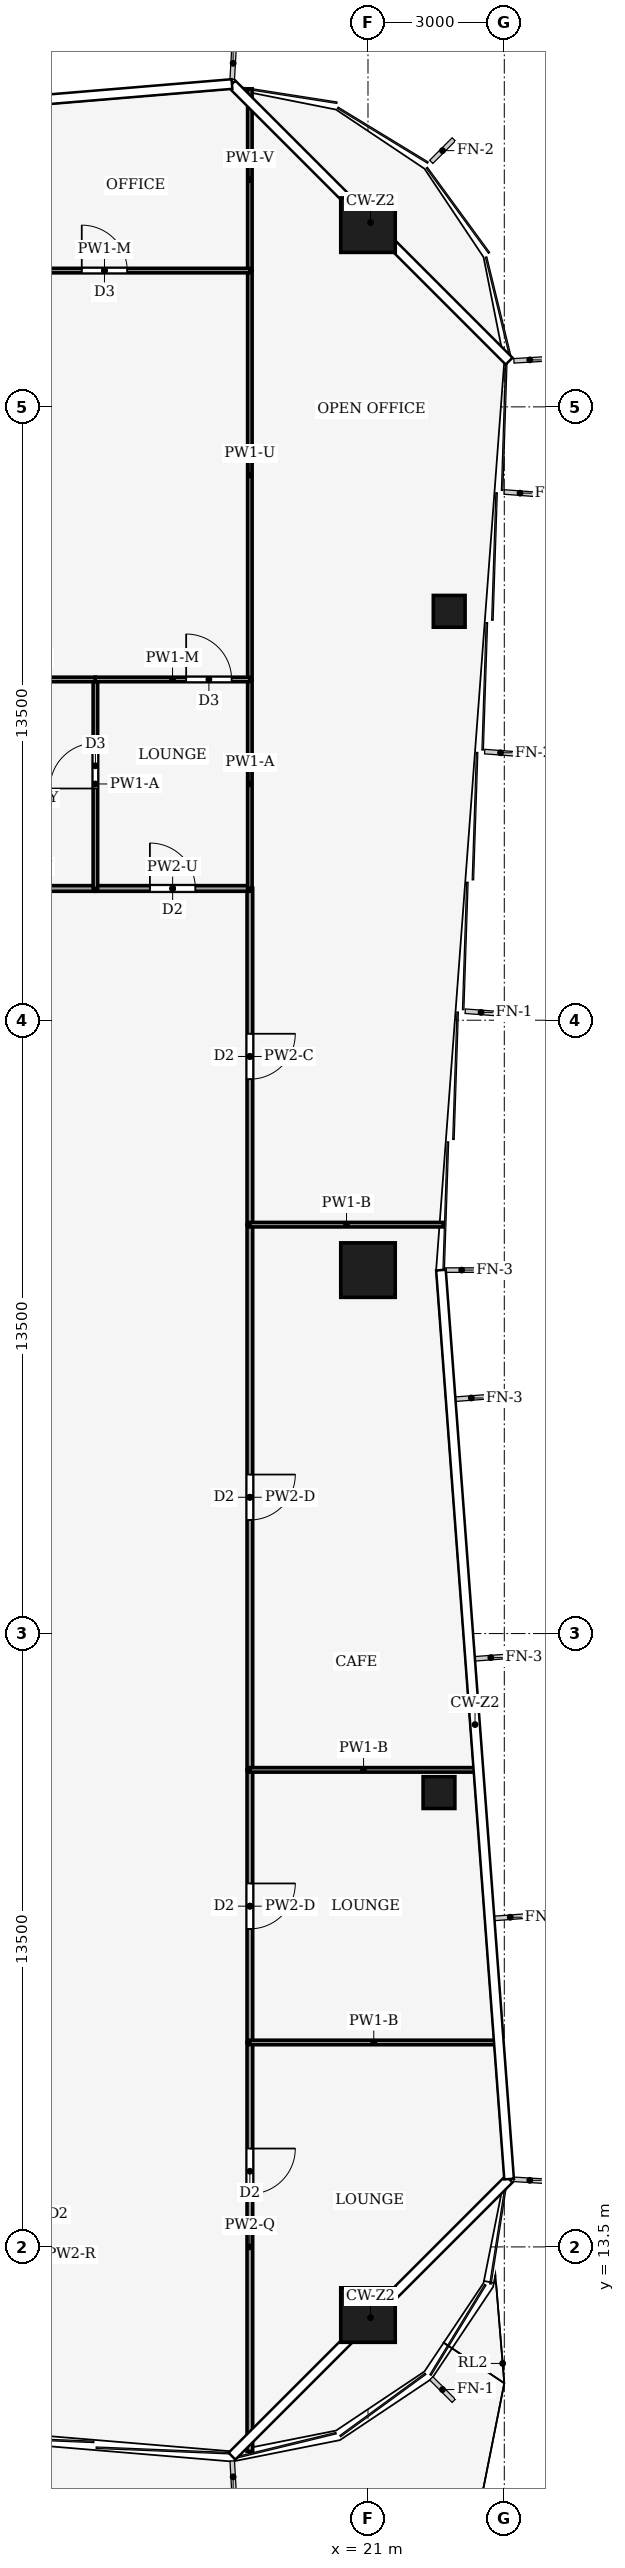
"""IFC4 building model, lengths in metres.
Left out: names, types, materials, properties, quantities, classifications, styles, units other than length and angle.
Written with IfcOpenShell. Run it as: python <this file> out.ifc"""

import sys

from ifc_helpers import new_model, si_unit, direction, frame, frame_2d, origin, origin_2d, place, context, subcontext, project, spatial, rectangle, hollow_rectangle, extrude, element, fill, save


model = new_model("IFC4")
c1 = context("Model", 3, precision=1e-05, world=origin(), true_north=direction((0.0, 1.0)))
c2 = subcontext(c1, "Body", "Model", "MODEL_VIEW")
j1 = project(units=[si_unit("LENGTHUNIT", "METRE"), si_unit("PLANEANGLEUNIT", "RADIAN")], contexts=[c1])
p1 = place(None, origin())
s1 = spatial("IfcSite", under=j1, at=p1, CompositionType="ELEMENT")
p2 = place(p1, origin())
s2 = spatial("IfcBuilding", under=s1, at=p2, CompositionType="ELEMENT")
p3 = place(p2, frame((0.0, 0.0, 121.0)))
s3 = spatial("IfcBuildingStorey", under=s2, at=p3, CompositionType="ELEMENT", Elevation=121.0)
for number, where, z_axis, x_axis in (
    (1, (21.0, 58.0, 0.0), (0.0, 0.0, 1.0), (1.0, 0.0, 0.0)),
    (2, (21.0, 35.0, 0.0), (0.0, 0.0, 1.0), (1.0, 0.0, 0.0)),
    (3, (21.0, 12.0, 0.0), (0.0, 0.0, 1.0), (1.0, 0.0, 0.0)),
):
    element("IfcColumn", number, at=place(p3, frame(where, z_axis=z_axis, x_axis=x_axis)), inside=s3, PredefinedType="COLUMN", context=c2, shape_type="SweptSolid", body=[
        extrude(hollow_rectangle(XDim=1.2, YDim=1.2, WallThickness=0.07, at=origin_2d()), origin(), (0.0, 0.0, 1.0), 5.0),
    ])
for number, where, z_axis, x_axis in (
    (4, (22.562, 23.5, 0.0), (0.0, 0.0, 1.0), (1.0, 0.0, 0.0)),
    (5, (22.788, 49.5, 0.0), (0.0, 0.0, 1.0), (1.0, 0.0, 0.0)),
):
    element("IfcColumn", number, at=place(p3, frame(where, z_axis=z_axis, x_axis=x_axis)), inside=s3, PredefinedType="COLUMN", context=c2, shape_type="SweptSolid", body=[
        extrude(hollow_rectangle(XDim=0.7, YDim=0.7, WallThickness=0.03, at=origin_2d()), origin(), (0.0, 0.0, 1.0), 5.0),
    ])
p4 = place(p3, frame((18.4, 18.0, 0.0), z_axis=(0.0, 0.0, 1.0), x_axis=(0.0, -1.0, 0.0)))
e6 = element("IfcWall", 6, at=p4, inside=s3, PredefinedType="PARTITIONING", context=c2, shape_type="SweptSolid", body=[
    extrude(rectangle(XDim=9.0, YDim=0.125, at=frame_2d((4.5, 0.0))), origin(), (0.0, 0.0, 1.0), 3.93),
])
p5 = place(p4, frame((2.335, 0.0, 0.0)))
e7 = element("IfcOpeningElement", 7, at=p5, cuts=e6, PredefinedType="OPENING", context=c2, shape_type="SweptSolid", body=[
    extrude(rectangle(XDim=1.0, YDim=2.1, at=frame_2d((0.5, 1.05))), frame((0.0, 0.073, 0.0), z_axis=(0.0, -1.0, 0.0), x_axis=(1.0, 0.0, 0.0)), (0.0, 0.0, 1.0), 0.145),
])
p6 = place(p3, frame((18.4, 24.0, 0.0), z_axis=(0.0, 0.0, 1.0), x_axis=(0.0, -1.0, 0.0)))
e8 = element("IfcWall", 8, at=p6, inside=s3, PredefinedType="PARTITIONING", context=c2, shape_type="SweptSolid", body=[
    extrude(rectangle(XDim=6.0, YDim=0.125, at=frame_2d((3.0, 0.0))), origin(), (0.0, 0.0, 1.0), 4.48),
])
p7 = place(p6, frame((2.5, 0.0, 0.0)))
e9 = element("IfcOpeningElement", 9, at=p7, cuts=e8, PredefinedType="OPENING", context=c2, shape_type="SweptSolid", body=[
    extrude(rectangle(XDim=1.0, YDim=2.1, at=frame_2d((0.5, 1.05))), frame((0.0, 0.073, 0.0), z_axis=(0.0, -1.0, 0.0), x_axis=(1.0, 0.0, 0.0)), (0.0, 0.0, 1.0), 0.145),
])
p8 = place(p3, frame((18.4, 36.0, 0.0), z_axis=(0.0, 0.0, 1.0), x_axis=(0.0, -1.0, 0.0)))
e10 = element("IfcWall", 10, at=p8, inside=s3, PredefinedType="PARTITIONING", context=c2, shape_type="SweptSolid", body=[
    extrude(rectangle(XDim=12.0, YDim=0.125, at=frame_2d((6.0, 0.0))), origin(), (0.0, 0.0, 1.0), 4.48),
])
p9 = place(p8, frame((5.5, 0.0, 0.0)))
e11 = element("IfcOpeningElement", 11, at=p9, cuts=e10, PredefinedType="OPENING", context=c2, shape_type="SweptSolid", body=[
    extrude(rectangle(XDim=1.0, YDim=2.1, at=frame_2d((0.5, 1.05))), frame((0.0, 0.073, 0.0), z_axis=(0.0, -1.0, 0.0), x_axis=(1.0, 0.0, 0.0)), (0.0, 0.0, 1.0), 0.145),
])
p10 = place(p3, frame((18.4, 43.404, 0.0), z_axis=(0.0, 0.0, 1.0), x_axis=(0.0, -1.0, 0.0)))
e12 = element("IfcWall", 12, at=p10, inside=s3, PredefinedType="PARTITIONING", context=c2, shape_type="SweptSolid", body=[
    extrude(rectangle(XDim=7.404, YDim=0.125, at=frame_2d((3.702, 0.0))), origin(), (0.0, 0.0, 1.0), 4.14),
])
p11 = place(p10, frame((3.202, 0.0, 0.0)))
e13 = element("IfcOpeningElement", 13, at=p11, cuts=e12, PredefinedType="OPENING", context=c2, shape_type="SweptSolid", body=[
    extrude(rectangle(XDim=1.0, YDim=2.1, at=frame_2d((0.5, 1.05))), frame((0.0, 0.073, 0.0), z_axis=(0.0, -1.0, 0.0), x_axis=(1.0, 0.0, 0.0)), (0.0, 0.0, 1.0), 0.145),
])
p12 = place(p3, frame((15.0, 43.4, 0.0), z_axis=(0.0, 0.0, 1.0), x_axis=(-1.0, 0.0, 0.0)))
e14 = element("IfcWall", 14, at=p12, inside=s3, PredefinedType="PARTITIONING", context=c2, shape_type="SweptSolid", body=[
    extrude(rectangle(XDim=3.0, YDim=0.125, at=frame_2d((1.5, 0.0))), origin(), (0.0, 0.0, 1.0), 4.44),
])
p13 = place(p3, frame((15.0, 43.4, 0.0), z_axis=(0.0, 0.0, 1.0), x_axis=(1.0, 0.0, 0.0)))
e15 = element("IfcWall", 15, at=p13, inside=s3, PredefinedType="PARTITIONING", context=c2, shape_type="SweptSolid", body=[
    extrude(rectangle(XDim=3.4, YDim=0.125, at=frame_2d((1.7, 0.0))), origin(), (0.0, 0.0, 1.0), 4.44),
])
p14 = place(p13, frame((1.2, 0.0, 0.0)))
e16 = element("IfcOpeningElement", 16, at=p14, cuts=e15, PredefinedType="OPENING", context=c2, shape_type="SweptSolid", body=[
    extrude(rectangle(XDim=1.0, YDim=2.1, at=frame_2d((0.5, 1.05))), frame((0.0, 0.073, 0.0), z_axis=(0.0, -1.0, 0.0), x_axis=(1.0, 0.0, 0.0)), (0.0, 0.0, 1.0), 0.145),
])
p15 = place(p3, frame((23.855, 18.0, 0.0), z_axis=(0.0, 0.0, 1.0), x_axis=(-1.0, 0.0, 0.0)))
e17 = element("IfcWall", 17, at=p15, inside=s3, PredefinedType="PARTITIONING", context=c2, shape_type="SweptSolid", body=[
    extrude(rectangle(XDim=5.455, YDim=0.1, at=frame_2d((2.728, 0.0))), origin(), (0.0, 0.0, 1.0), 4.04),
])
p16 = place(p3, frame((23.405, 24.0, 0.0), z_axis=(0.0, 0.0, 1.0), x_axis=(-1.0, 0.0, 0.0)))
e18 = element("IfcWall", 18, at=p16, inside=s3, PredefinedType="PARTITIONING", context=c2, shape_type="SweptSolid", body=[
    extrude(rectangle(XDim=5.005, YDim=0.1, at=frame_2d((2.502, 0.0))), origin(), (0.0, 0.0, 1.0), 4.04),
])
p17 = place(p3, frame((22.655, 36.0, 0.0), z_axis=(0.0, 0.0, 1.0), x_axis=(-1.0, 0.0, 0.0)))
e19 = element("IfcWall", 19, at=p17, inside=s3, PredefinedType="PARTITIONING", context=c2, shape_type="SweptSolid", body=[
    extrude(rectangle(XDim=4.255, YDim=0.1, at=frame_2d((2.127, 0.0))), origin(), (0.0, 0.0, 1.0), 4.04),
])
p18 = place(p3, frame((18.4, 48.0, 0.0), z_axis=(0.0, 0.0, 1.0), x_axis=(0.0, -1.0, 0.0)))
e20 = element("IfcWall", 20, at=p18, inside=s3, PredefinedType="PARTITIONING", context=c2, shape_type="SweptSolid", body=[
    extrude(rectangle(XDim=4.6, YDim=0.1, at=frame_2d((2.3, 0.0))), origin(), (0.0, 0.0, 1.0), 4.87),
])
p19 = place(p3, frame((18.4, 57.0, 0.0), z_axis=(0.0, 0.0, 1.0), x_axis=(0.0, -1.0, 0.0)))
e21 = element("IfcWall", 21, at=p19, inside=s3, PredefinedType="PARTITIONING", context=c2, shape_type="SweptSolid", body=[
    extrude(rectangle(XDim=9.0, YDim=0.1, at=frame_2d((4.5, 0.0))), origin(), (0.0, 0.0, 1.0), 4.24),
])
p20 = place(p3, frame((18.4, 61.0, 0.0), z_axis=(0.0, 0.0, 1.0), x_axis=(0.0, -1.0, 0.0)))
e22 = element("IfcWall", 22, at=p20, inside=s3, PredefinedType="PARTITIONING", context=c2, shape_type="SweptSolid", body=[
    extrude(rectangle(XDim=4.0, YDim=0.1, at=frame_2d((2.0, 0.0))), origin(), (0.0, 0.0, 1.0), 3.93),
])
p21 = place(p3, frame((15.0, 43.4, 0.0), z_axis=(0.0, 0.0, 1.0), x_axis=(0.0, 1.0, 0.0)))
e23 = element("IfcWall", 23, at=p21, inside=s3, PredefinedType="PARTITIONING", context=c2, shape_type="SweptSolid", body=[
    extrude(rectangle(XDim=4.6, YDim=0.1, at=frame_2d((2.3, 0.0))), origin(), (0.0, 0.0, 1.0), 4.87),
])
p22 = place(p21, frame((2.2, 0.0, 0.0)))
e24 = element("IfcOpeningElement", 24, at=p22, cuts=e23, PredefinedType="OPENING", context=c2, shape_type="SweptSolid", body=[
    extrude(rectangle(XDim=1.0, YDim=2.1, at=frame_2d((0.5, 1.05))), frame((0.0, 0.06, 0.0), z_axis=(0.0, -1.0, 0.0), x_axis=(1.0, 0.0, 0.0)), (0.0, 0.0, 1.0), 0.12),
])
p23 = place(p3, frame((15.004, 48.0, 0.0), z_axis=(0.0, 0.0, 1.0), x_axis=(-1.0, 0.0, 0.0)))
e25 = element("IfcWall", 25, at=p23, inside=s3, PredefinedType="PARTITIONING", context=c2, shape_type="SweptSolid", body=[
    extrude(rectangle(XDim=3.008, YDim=0.1, at=frame_2d((1.504, 0.0))), origin(), (0.0, 0.0, 1.0), 4.87),
])
p24 = place(p3, frame((14.996, 48.0, 0.0), z_axis=(0.0, 0.0, 1.0), x_axis=(1.0, 0.0, 0.0)))
e26 = element("IfcWall", 26, at=p24, inside=s3, PredefinedType="PARTITIONING", context=c2, shape_type="SweptSolid", body=[
    extrude(rectangle(XDim=3.404, YDim=0.1, at=frame_2d((1.702, 0.0))), origin(), (0.0, 0.0, 1.0), 4.44),
])
p25 = place(p24, frame((2.002, 0.0, 0.0)))
e27 = element("IfcOpeningElement", 27, at=p25, cuts=e26, PredefinedType="OPENING", context=c2, shape_type="SweptSolid", body=[
    extrude(rectangle(XDim=1.0, YDim=2.1, at=frame_2d((0.5, 1.05))), frame((0.0, 0.06, 0.0), z_axis=(0.0, -1.0, 0.0), x_axis=(1.0, 0.0, 0.0)), (0.0, 0.0, 1.0), 0.12),
])
p26 = place(p3, frame((12.0, 57.0, 0.0), z_axis=(0.0, 0.0, 1.0), x_axis=(1.0, 0.0, 0.0)))
e28 = element("IfcWall", 28, at=p26, inside=s3, PredefinedType="PARTITIONING", context=c2, shape_type="SweptSolid", body=[
    extrude(rectangle(XDim=6.4, YDim=0.1, at=frame_2d((3.2, 0.0))), origin(), (0.0, 0.0, 1.0), 4.44),
])
p27 = place(p26, frame((2.7, 0.0, 0.0)))
e29 = element("IfcOpeningElement", 29, at=p27, cuts=e28, PredefinedType="OPENING", context=c2, shape_type="SweptSolid", body=[
    extrude(rectangle(XDim=1.0, YDim=2.1, at=frame_2d((0.5, 1.05))), frame((0.0, 0.06, 0.0), z_axis=(0.0, -1.0, 0.0), x_axis=(1.0, 0.0, 0.0)), (0.0, 0.0, 1.0), 0.12),
])
p28 = place(p5, origin())
e30 = element("IfcDoor", 30, at=p28, inside=s3, OperationType="SINGLE_SWING_LEFT", PredefinedType="DOOR", context=c2, shape_type="SweptSolid", body=[
    extrude(rectangle(XDim=1.0, YDim=2.1, at=frame_2d((0.5, 1.05))), frame((0.0, 0.025, 0.0), z_axis=(0.0, -1.0, 0.0), x_axis=(1.0, 0.0, 0.0)), (0.0, 0.0, 1.0), 0.05),
])
fill(e7, e30)
p29 = place(p7, origin())
e31 = element("IfcDoor", 31, at=p29, inside=s3, OperationType="SINGLE_SWING_RIGHT", PredefinedType="DOOR", context=c2, shape_type="SweptSolid", body=[
    extrude(rectangle(XDim=1.0, YDim=2.1, at=frame_2d((0.5, 1.05))), frame((0.0, 0.025, 0.0), z_axis=(0.0, -1.0, 0.0), x_axis=(1.0, 0.0, 0.0)), (0.0, 0.0, 1.0), 0.05),
])
fill(e9, e31)
p30 = place(p9, origin())
e32 = element("IfcDoor", 32, at=p30, inside=s3, OperationType="SINGLE_SWING_LEFT", PredefinedType="DOOR", context=c2, shape_type="SweptSolid", body=[
    extrude(rectangle(XDim=1.0, YDim=2.1, at=frame_2d((0.5, 1.05))), frame((0.0, 0.025, 0.0), z_axis=(0.0, -1.0, 0.0), x_axis=(1.0, 0.0, 0.0)), (0.0, 0.0, 1.0), 0.05),
])
fill(e11, e32)
p31 = place(p11, origin())
e33 = element("IfcDoor", 33, at=p31, inside=s3, OperationType="SINGLE_SWING_RIGHT", PredefinedType="DOOR", context=c2, shape_type="SweptSolid", body=[
    extrude(rectangle(XDim=1.0, YDim=2.1, at=frame_2d((0.5, 1.05))), frame((0.0, 0.025, 0.0), z_axis=(0.0, -1.0, 0.0), x_axis=(1.0, 0.0, 0.0)), (0.0, 0.0, 1.0), 0.05),
])
fill(e13, e33)
p32 = place(p14, origin())
e34 = element("IfcDoor", 34, at=p32, inside=s3, OperationType="SINGLE_SWING_RIGHT", PredefinedType="DOOR", context=c2, shape_type="SweptSolid", body=[
    extrude(rectangle(XDim=1.0, YDim=2.1, at=frame_2d((0.5, 1.05))), frame((0.0, 0.025, 0.0), z_axis=(0.0, -1.0, 0.0), x_axis=(1.0, 0.0, 0.0)), (0.0, 0.0, 1.0), 0.05),
])
fill(e16, e34)
p33 = place(p22, origin())
e35 = element("IfcDoor", 35, at=p33, inside=s3, OperationType="SINGLE_SWING_RIGHT", PredefinedType="DOOR", context=c2, shape_type="SweptSolid", body=[
    extrude(rectangle(XDim=1.0, YDim=2.1, at=frame_2d((0.5, 1.05))), frame((0.0, 0.025, 0.0), z_axis=(0.0, -1.0, 0.0), x_axis=(1.0, 0.0, 0.0)), (0.0, 0.0, 1.0), 0.05),
])
fill(e24, e35)
p34 = place(p25, origin())
e36 = element("IfcDoor", 36, at=p34, inside=s3, OperationType="SINGLE_SWING_RIGHT", PredefinedType="DOOR", context=c2, shape_type="SweptSolid", body=[
    extrude(rectangle(XDim=1.0, YDim=2.1, at=frame_2d((0.5, 1.05))), frame((0.0, 0.025, 0.0), z_axis=(0.0, -1.0, 0.0), x_axis=(1.0, 0.0, 0.0)), (0.0, 0.0, 1.0), 0.05),
])
fill(e27, e36)
p35 = place(p27, origin())
e37 = element("IfcDoor", 37, at=p35, inside=s3, OperationType="SINGLE_SWING_LEFT", PredefinedType="DOOR", context=c2, shape_type="SweptSolid", body=[
    extrude(rectangle(XDim=1.0, YDim=2.1, at=frame_2d((0.5, 1.05))), frame((0.0, 0.025, 0.0), z_axis=(0.0, -1.0, 0.0), x_axis=(1.0, 0.0, 0.0)), (0.0, 0.0, 1.0), 0.05),
])
fill(e29, e37)
save(model, sys.argv[1])
